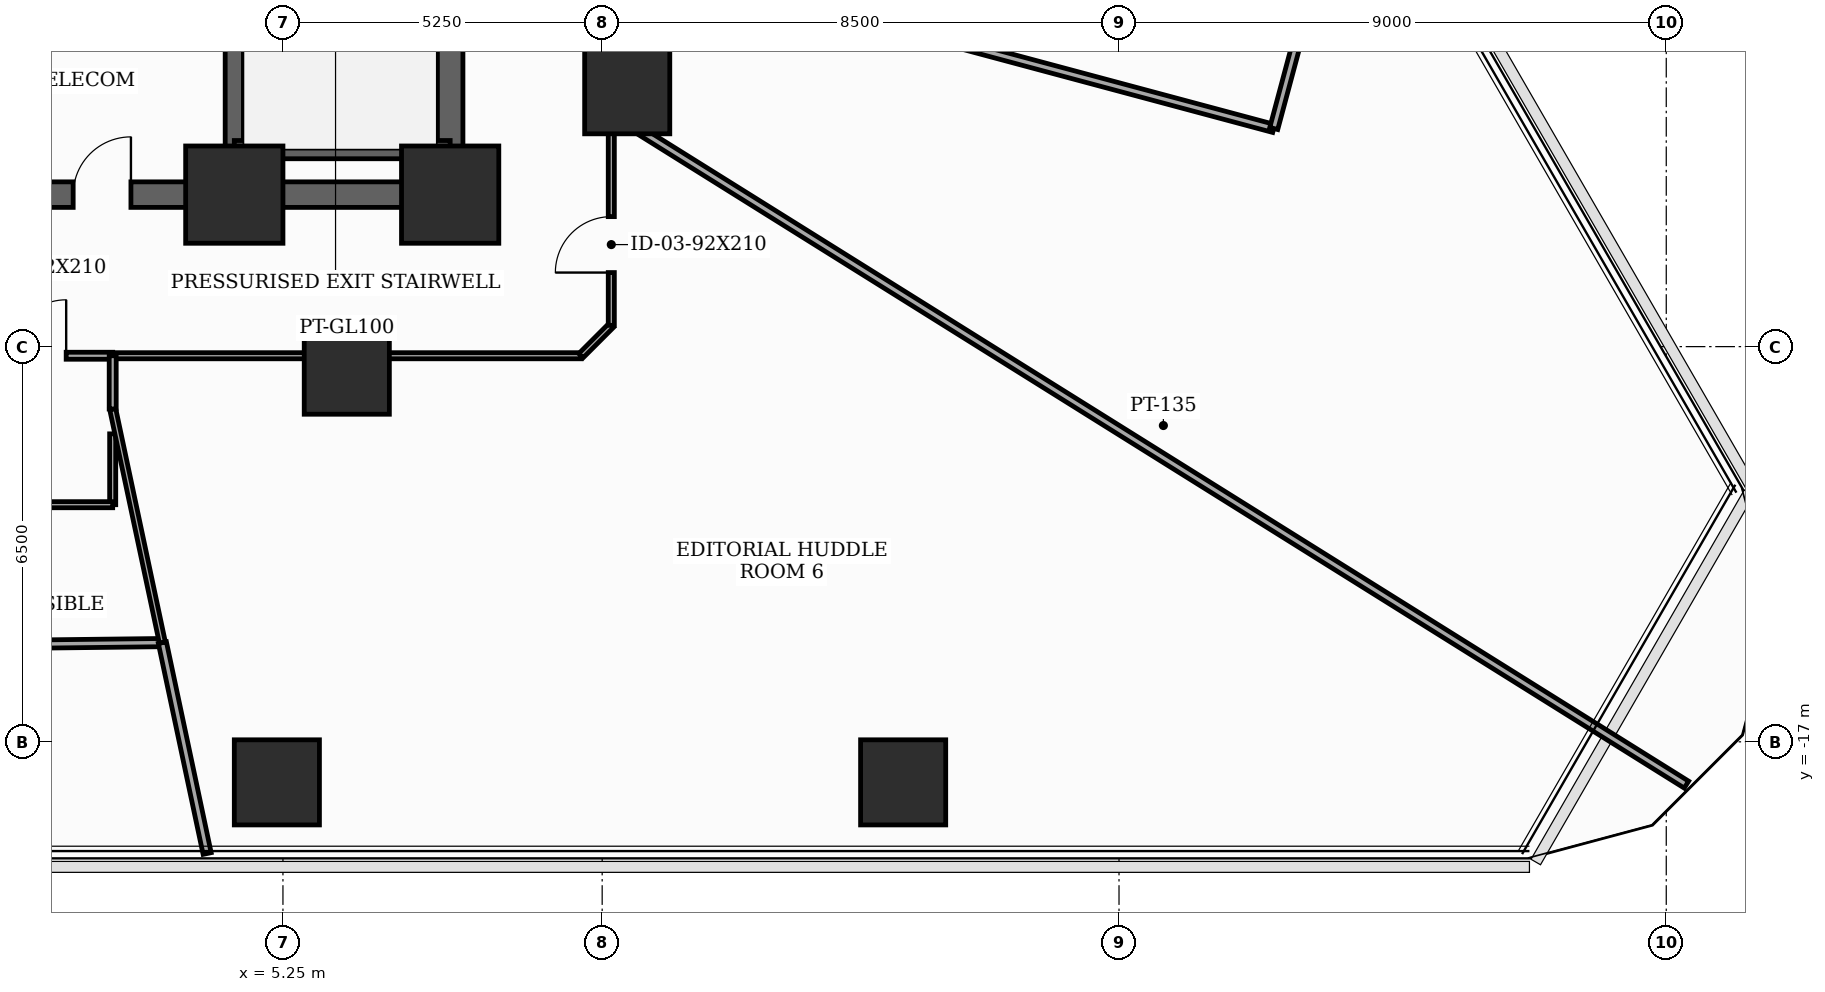
"""IFC4 building model, lengths in metres.
Left out: names, types, materials, properties, quantities, classifications, styles, units other than length and angle.
Written with IfcOpenShell. Run it as: python <this file> out.ifc"""

import sys

from ifc_helpers import new_model, si_unit, direction, frame, frame_2d, origin, origin_2d, place, context, subcontext, project, spatial, rectangle, extrude, element, fill, save


model = new_model("IFC4")
c1 = context("Model", 3, precision=1e-05, world=origin(), true_north=direction((0.0, 1.0)))
c2 = subcontext(c1, "Body", "Model", "MODEL_VIEW")
j1 = project(units=[si_unit("LENGTHUNIT", "METRE"), si_unit("PLANEANGLEUNIT", "RADIAN")], contexts=[c1])
p1 = place(None, origin())
s1 = spatial("IfcSite", under=j1, at=p1, CompositionType="ELEMENT")
p2 = place(p1, origin())
s2 = spatial("IfcBuilding", under=s1, at=p2, CompositionType="ELEMENT")
p3 = place(p2, frame((0.0, 0.0, 33.4)))
s3 = spatial("IfcBuildingStorey", under=s2, at=p3, CompositionType="ELEMENT", Elevation=33.4)
for number, where, z_axis, x_axis in (
    (1, (4.45, -8.0, 0.0), (0.0, 0.0, 1.0), (1.0, 0.0, 0.0)),
    (2, (8.0, -8.0, 0.0), (0.0, 0.0, 1.0), (1.0, 0.0, 0.0)),
):
    element("IfcColumn", number, at=place(p3, frame(where, z_axis=z_axis, x_axis=x_axis)), inside=s3, PredefinedType="COLUMN", context=c2, shape_type="SweptSolid", body=[
        extrude(rectangle(XDim=1.6, YDim=1.6, at=origin_2d()), origin(), (0.0, 0.0, 1.0), 3.7),
    ])
for number, where, z_axis, x_axis in (
    (3, (6.3, -10.912, 0.0), (0.0, 0.0, 1.0), (1.0, 0.0, 0.0)),
    (4, (10.912, -6.3, 0.0), (0.0, 0.0, 1.0), (1.0, 0.0, 0.0)),
    (5, (5.15, -17.667, 0.0), (0.0, 0.0, 1.0), (1.0, 0.0, 0.0)),
    (6, (15.45, -17.667, 0.0), (0.0, 0.0, 1.0), (1.0, 0.0, 0.0)),
):
    element("IfcColumn", number, at=place(p3, frame(where, z_axis=z_axis, x_axis=x_axis)), inside=s3, PredefinedType="COLUMN", context=c2, shape_type="SweptSolid", body=[
        extrude(rectangle(XDim=1.4, YDim=1.4, at=origin_2d()), origin(), (0.0, 0.0, 1.0), 3.7),
    ])
p4 = place(p3, frame((8.0, -8.0, 0.0), z_axis=(0.0, 0.0, 1.0), x_axis=(0.0, 1.0, 0.0)))
e7 = element("IfcWall", 7, at=p4, inside=s3, PredefinedType="SHEAR", context=c2, shape_type="SweptSolid", body=[
    extrude(rectangle(XDim=16.0, YDim=0.42, at=frame_2d((8.0, 0.0))), origin(), (0.0, 0.0, 1.0), 3.5),
])
p5 = place(p4, frame((9.6, 0.0, 0.0)))
e8 = element("IfcOpeningElement", 8, at=p5, cuts=e7, PredefinedType="OPENING", context=c2, shape_type="SweptSolid", body=[
    extrude(rectangle(XDim=1.05, YDim=2.15, at=frame_2d((0.525, 1.075))), frame((0.0, 0.22, 0.0), z_axis=(0.0, -1.0, 0.0), x_axis=(1.0, 0.0, 0.0)), (0.0, 0.0, 1.0), 0.44),
])
p6 = place(p4, frame((14.148, 0.0, 0.0)))
e9 = element("IfcOpeningElement", 9, at=p6, cuts=e7, PredefinedType="OPENING", context=c2, shape_type="SweptSolid", body=[
    extrude(rectangle(XDim=0.85, YDim=2.02, at=frame_2d((0.425, 1.01))), frame((0.0, 0.22, 0.0), z_axis=(0.0, -1.0, 0.0), x_axis=(1.0, 0.0, 0.0)), (0.0, 0.0, 1.0), 0.44),
])
p7 = place(p3, frame((-8.0, -8.0, 0.0), z_axis=(0.0, 0.0, 1.0), x_axis=(1.0, 0.0, 0.0)))
e10 = element("IfcWall", 10, at=p7, inside=s3, PredefinedType="SHEAR", context=c2, shape_type="SweptSolid", body=[
    extrude(rectangle(XDim=16.0, YDim=0.42, at=frame_2d((8.0, 0.0))), origin(), (0.0, 0.0, 1.0), 3.5),
])
p8 = place(p7, frame((5.2, 0.0, 0.0)))
e11 = element("IfcOpeningElement", 11, at=p8, cuts=e10, PredefinedType="OPENING", context=c2, shape_type="SweptSolid", body=[
    extrude(rectangle(XDim=0.95, YDim=2.1, at=frame_2d((0.475, 1.05))), frame((0.0, 0.22, 0.0), z_axis=(0.0, -1.0, 0.0), x_axis=(1.0, 0.0, 0.0)), (0.0, 0.0, 1.0), 0.44),
])
p9 = place(p7, frame((9.8, 0.0, 0.0)))
e12 = element("IfcOpeningElement", 12, at=p9, cuts=e10, PredefinedType="OPENING", context=c2, shape_type="SweptSolid", body=[
    extrude(rectangle(XDim=0.95, YDim=2.1, at=frame_2d((0.475, 1.05))), frame((0.0, 0.22, 0.0), z_axis=(0.0, -1.0, 0.0), x_axis=(1.0, 0.0, 0.0)), (0.0, 0.0, 1.0), 0.44),
])
p10 = place(p3, frame((4.45, -7.79, 0.0), z_axis=(0.0, 0.0, 1.0), x_axis=(0.0, 1.0, 0.0)))
e13 = element("IfcWall", 13, at=p10, inside=s3, PredefinedType="SHEAR", context=c2, shape_type="SweptSolid", body=[
    extrude(rectangle(XDim=15.58, YDim=0.3, at=frame_2d((7.79, 0.0))), origin(), (0.0, 0.0, 1.0), 3.5),
])
p11 = place(p3, frame((4.45, -7.26, 0.0), z_axis=(0.0, 0.0, 1.0), x_axis=(1.0, 0.0, 0.0)))
e14 = element("IfcWall", 14, at=p11, inside=s3, PredefinedType="SHEAR", context=c2, shape_type="SweptSolid", body=[
    extrude(rectangle(XDim=3.55, YDim=0.3, at=frame_2d((1.775, 0.0))), origin(), (0.0, 0.0, 1.0), 3.5),
])
p12 = place(p3, frame((10.65, -6.655, 0.0), z_axis=(0.0, 0.0, 1.0), x_axis=(0.0, 1.0, 0.0)))
e15 = element("IfcWall", 15, at=p12, inside=s3, PredefinedType="PARTITIONING", context=c2, shape_type="SweptSolid", body=[
    extrude(rectangle(XDim=2.663, YDim=0.135, at=frame_2d((1.332, 0.0))), origin(), (0.0, 0.0, 1.0), 2.785),
])
p13 = place(p3, frame((10.65, -3.992, 0.0), z_axis=(0.0, 0.0, 1.0), x_axis=(0.965906888357, -0.258889712088, 0.0)))
e16 = element("IfcWall", 16, at=p13, inside=s3, PredefinedType="PARTITIONING", context=c2, shape_type="SweptSolid", body=[
    extrude(rectangle(XDim=11.28, YDim=0.135, at=frame_2d((5.64, 0.0))), origin(), (0.0, 0.0, 1.0), 2.785),
])
p14 = place(p3, frame((21.545, -6.912, 0.0), z_axis=(0.0, 0.0, 1.0), x_axis=(0.259105843213, 0.965848933329, 0.0)))
e17 = element("IfcWall", 17, at=p14, inside=s3, PredefinedType="PARTITIONING", context=c2, shape_type="SweptSolid", body=[
    extrude(rectangle(XDim=2.2, YDim=0.135, at=frame_2d((1.1, 0.0))), origin(), (0.0, 0.0, 1.0), 2.935),
])
p15 = place(p3, frame((0.0, -10.65, 0.0), z_axis=(0.0, 0.0, 1.0), x_axis=(1.0, 0.0, 0.0)))
e18 = element("IfcWall", 18, at=p15, inside=s3, PredefinedType="PARTITIONING", context=c2, shape_type="SweptSolid", body=[
    extrude(rectangle(XDim=2.45, YDim=0.115, at=frame_2d((1.225, 0.0))), origin(), (0.0, 0.0, 1.0), 3.5),
])
p16 = place(p15, frame((0.765, 0.0, 0.0)))
e19 = element("IfcOpeningElement", 19, at=p16, cuts=e18, PredefinedType="OPENING", context=c2, shape_type="SweptSolid", body=[
    extrude(rectangle(XDim=0.92, YDim=2.1, at=frame_2d((0.46, 1.05))), frame((0.0, 0.067, 0.0), z_axis=(0.0, -1.0, 0.0), x_axis=(1.0, 0.0, 0.0)), (0.0, 0.0, 1.0), 0.135),
])
p17 = place(p3, frame((2.45, -10.65, 0.0), z_axis=(0.0, 0.0, 1.0), x_axis=(1.0, 0.0, 0.0)))
e20 = element("IfcWall", 20, at=p17, inside=s3, PredefinedType="MOVABLE", context=c2, shape_type="SweptSolid", body=[
    extrude(rectangle(XDim=7.7, YDim=0.1, at=frame_2d((3.85, 0.0))), origin(), (0.0, 0.0, 1.0), 2.785),
])
p18 = place(p3, frame((10.15, -10.65, 0.0), z_axis=(0.0, 0.0, 1.0), x_axis=(0.707106781187, 0.707106781187, 0.0)))
e21 = element("IfcWall", 21, at=p18, inside=s3, PredefinedType="MOVABLE", context=c2, shape_type="SweptSolid", body=[
    extrude(rectangle(XDim=0.707, YDim=0.1, at=frame_2d((0.354, 0.0))), origin(), (0.0, 0.0, 1.0), 3.5),
])
p19 = place(p3, frame((10.65, -10.15, 0.0), z_axis=(0.0, 0.0, 1.0), x_axis=(0.0, 1.0, 0.0)))
e22 = element("IfcWall", 22, at=p19, inside=s3, PredefinedType="MOVABLE", context=c2, shape_type="SweptSolid", body=[
    extrude(rectangle(XDim=3.495, YDim=0.1, at=frame_2d((1.748, 0.0))), origin(), (0.0, 0.0, 1.0), 2.785),
])
p20 = place(p19, frame((0.868, 0.0, 0.0)))
e23 = element("IfcOpeningElement", 23, at=p20, cuts=e22, PredefinedType="OPENING", context=c2, shape_type="SweptSolid", body=[
    extrude(rectangle(XDim=0.92, YDim=2.1, at=frame_2d((0.46, 1.05))), frame((0.0, 0.06, 0.0), z_axis=(0.0, -1.0, 0.0), x_axis=(1.0, 0.0, 0.0)), (0.0, 0.0, 1.0), 0.12),
])
p21 = place(p3, frame((10.65, -6.655, 0.0), z_axis=(0.0, 0.0, 1.0), x_axis=(0.848052240981, -0.529912631069, 0.0)))
e24 = element("IfcWall", 24, at=p21, inside=s3, PredefinedType="PARTITIONING", context=c2, shape_type="SweptSolid", body=[
    extrude(rectangle(XDim=20.85, YDim=0.135, at=frame_2d((10.425, 0.0))), origin(), (0.0, 0.0, 1.0), 2.785),
])
p22 = place(p3, frame((3.267, -15.368, 0.0), z_axis=(0.0, 0.0, 1.0), x_axis=(-0.999931630146, -0.011693375588, 0.0)))
e25 = element("IfcWall", 25, at=p22, inside=s3, PredefinedType="PARTITIONING", context=c2, shape_type="SweptSolid", body=[
    extrude(rectangle(XDim=6.598, YDim=0.135, at=frame_2d((3.299, 0.0))), origin(), (0.0, 0.0, 1.0), 3.5),
])
p23 = place(p3, frame((4.003, -18.837, 0.0), z_axis=(0.0, 0.0, 1.0), x_axis=(-0.207633969896, 0.978206590933, 0.0)))
e26 = element("IfcWall", 26, at=p23, inside=s3, PredefinedType="PARTITIONING", context=c2, shape_type="SweptSolid", body=[
    extrude(rectangle(XDim=3.546, YDim=0.135, at=frame_2d((1.773, 0.0))), origin(), (0.0, 0.0, 1.0), 2.935),
])
p24 = place(p3, frame((2.45, -11.935, 0.0), z_axis=(0.0, 0.0, 1.0), x_axis=(0.0, -1.0, 0.0)))
e27 = element("IfcWall", 27, at=p24, inside=s3, PredefinedType="MOVABLE", context=c2, shape_type="SweptSolid", body=[
    extrude(rectangle(XDim=1.166, YDim=0.1, at=frame_2d((0.583, 0.0))), origin(), (0.0, 0.0, 1.0), 2.785),
])
p25 = place(p3, frame((2.45, -13.1, 0.0), z_axis=(0.0, 0.0, 1.0), x_axis=(-1.0, 0.0, 0.0)))
e28 = element("IfcWall", 28, at=p25, inside=s3, PredefinedType="MOVABLE", context=c2, shape_type="SweptSolid", body=[
    extrude(rectangle(XDim=2.45, YDim=0.1, at=frame_2d((1.225, 0.0))), origin(), (0.0, 0.0, 1.0), 3.5),
])
p26 = place(p3, frame((3.267, -15.368, 0.0), z_axis=(0.0, 0.0, 1.0), x_axis=(-0.208030469109, 0.978122346091, 0.0)))
e29 = element("IfcWall", 29, at=p26, inside=s3, PredefinedType="MOVABLE", context=c2, shape_type="SweptSolid", body=[
    extrude(rectangle(XDim=3.928, YDim=0.1, at=frame_2d((1.964, 0.0))), origin(), (0.0, 0.0, 1.0), 2.785),
])
p27 = place(p3, frame((2.45, -11.526, 0.0), z_axis=(0.0, 0.0, 1.0), x_axis=(0.0, 1.0, 0.0)))
e30 = element("IfcWall", 30, at=p27, inside=s3, PredefinedType="PARTITIONING", context=c2, shape_type="SweptSolid", body=[
    extrude(rectangle(XDim=0.876, YDim=0.115, at=frame_2d((0.438, 0.0))), origin(), (0.0, 0.0, 1.0), 3.5),
])
p28 = place(p9, origin())
e31 = element("IfcDoor", 31, at=p28, inside=s3, OperationType="SINGLE_SWING_RIGHT", PredefinedType="DOOR", context=c2, shape_type="SweptSolid", body=[
    extrude(rectangle(XDim=0.95, YDim=2.1, at=frame_2d((0.475, 1.05))), frame((0.0, 0.025, 0.0), z_axis=(0.0, -1.0, 0.0), x_axis=(1.0, 0.0, 0.0)), (0.0, 0.0, 1.0), 0.05),
])
fill(e12, e31)
p29 = place(p16, origin())
e32 = element("IfcDoor", 32, at=p29, inside=s3, OperationType="SINGLE_SWING_RIGHT", PredefinedType="DOOR", context=c2, shape_type="SweptSolid", body=[
    extrude(rectangle(XDim=0.92, YDim=2.1, at=frame_2d((0.46, 1.05))), frame((0.0, 0.025, 0.0), z_axis=(0.0, -1.0, 0.0), x_axis=(1.0, 0.0, 0.0)), (0.0, 0.0, 1.0), 0.05),
])
fill(e19, e32)
p30 = place(p20, origin())
e33 = element("IfcDoor", 33, at=p30, inside=s3, OperationType="SINGLE_SWING_LEFT", PredefinedType="DOOR", context=c2, shape_type="SweptSolid", body=[
    extrude(rectangle(XDim=0.92, YDim=2.1, at=frame_2d((0.46, 1.05))), frame((0.0, 0.025, 0.0), z_axis=(0.0, -1.0, 0.0), x_axis=(1.0, 0.0, 0.0)), (0.0, 0.0, 1.0), 0.05),
])
fill(e23, e33)
save(model, sys.argv[1])
